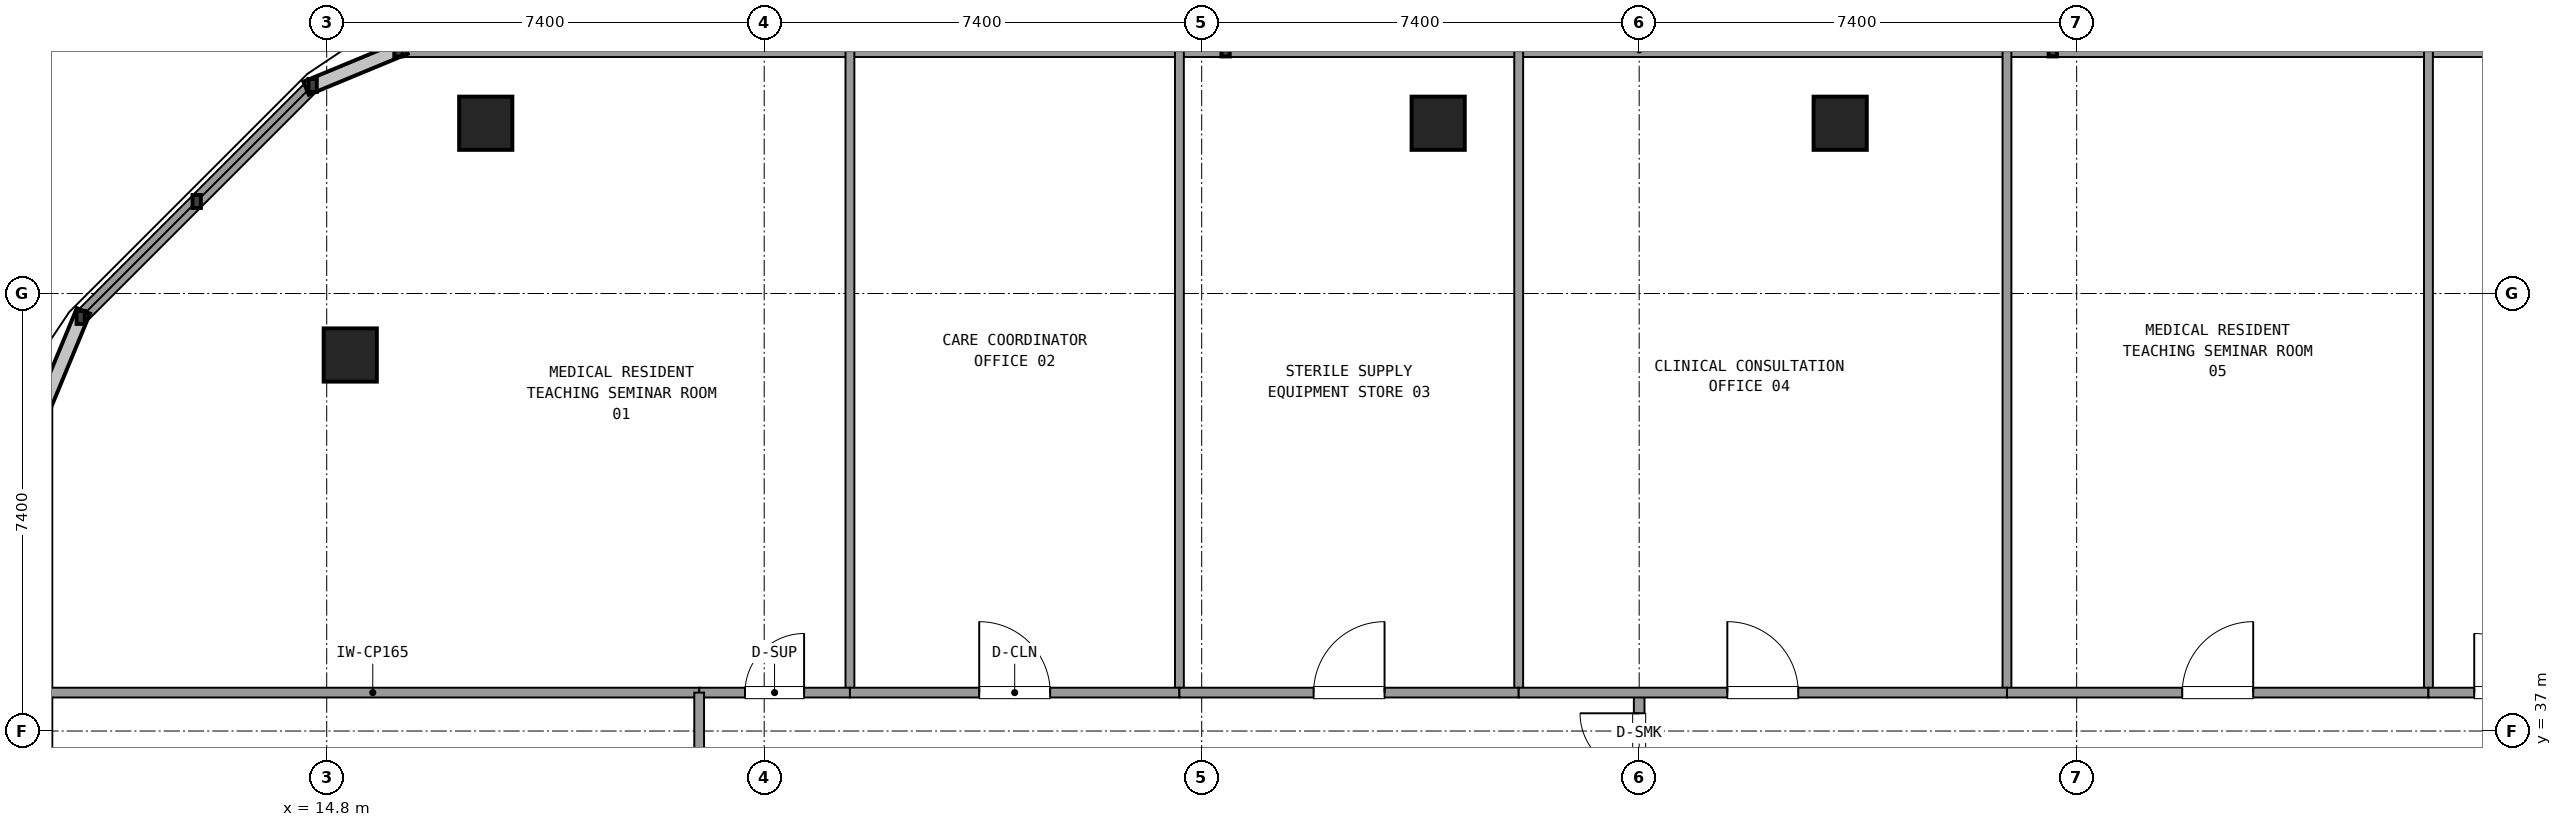
"""IFC4 building model, lengths in metres.
Left out: names, types, materials, properties, quantities, classifications, styles, units other than length and angle.
Written with IfcOpenShell. Run it as: python <this file> out.ifc"""

import sys

from ifc_helpers import new_model, si_unit, direction, frame, frame_2d, origin, origin_2d, place, context, subcontext, project, spatial, rectangle, extrude, element, fill, save


model = new_model("IFC4")
c1 = context("Model", 3, precision=1e-05, world=origin(), true_north=direction((0.0, 1.0)))
c2 = subcontext(c1, "Body", "Model", "MODEL_VIEW")
j1 = project(units=[si_unit("LENGTHUNIT", "METRE"), si_unit("PLANEANGLEUNIT", "RADIAN")], contexts=[c1])
p1 = place(None, origin())
s1 = spatial("IfcSite", under=j1, at=p1, CompositionType="ELEMENT")
p2 = place(p1, origin())
s2 = spatial("IfcBuilding", under=s1, at=p2, CompositionType="ELEMENT")
p3 = place(p2, frame((0.0, 0.0, 228.78)))
s3 = spatial("IfcBuildingStorey", under=s2, at=p3, CompositionType="ELEMENT", Elevation=228.78)
for number, where, z_axis, x_axis in (
    (1, (40.4, 47.28, 0.0), (0.0, 0.0, 1.0), (1.0, 0.0, 0.0)),
    (2, (33.6, 47.28, 0.0), (0.0, 0.0, 1.0), (1.0, 0.0, 0.0)),
    (3, (17.49, 47.28, 0.0), (0.0, 0.0, 1.0), (1.0, 0.0, 0.0)),
    (4, (15.198, 43.36, 0.0), (0.0, 0.0, 1.0), (1.0, 0.0, 0.0)),
):
    element("IfcColumn", number, at=place(p3, frame(where, z_axis=z_axis, x_axis=x_axis)), inside=s3, PredefinedType="COLUMN", context=c2, shape_type="SweptSolid", body=[
        extrude(rectangle(XDim=0.9, YDim=0.9, at=origin_2d()), origin(), (0.0, 0.0, 1.0), 3.6),
    ])
p4 = place(p3, frame((57.987, 48.52, 0.0), z_axis=(0.0, 0.0, 1.0), x_axis=(-1.0, 0.0, 0.0)))
e5 = element("IfcWall", 5, at=p4, inside=s3, PredefinedType="SOLIDWALL", context=c2, shape_type="SweptSolid", body=[
    extrude(rectangle(XDim=41.974, YDim=0.24, at=frame_2d((20.987, 0.0))), origin(), (0.0, 0.0, 1.0), 0.85),
])
p5 = place(p3, frame((14.562, 47.919, 0.0), z_axis=(0.0, 0.0, 1.0), x_axis=(-0.707128783731, -0.707084777957, 0.0)))
e6 = element("IfcWall", 6, at=p5, inside=s3, PredefinedType="SOLIDWALL", context=c2, shape_type="SweptSolid", body=[
    extrude(rectangle(XDim=5.548, YDim=0.24, at=frame_2d((2.774, 0.0))), origin(), (0.0, 0.0, 1.0), 0.85),
])
p6 = place(p3, frame((10.038, 42.545, 0.0), z_axis=(0.0, 0.0, 1.0), x_axis=(0.0, -1.0, 0.0)))
e7 = element("IfcWall", 7, at=p6, inside=s3, PredefinedType="SOLIDWALL", context=c2, shape_type="SweptSolid", body=[
    extrude(rectangle(XDim=15.105, YDim=0.24, at=frame_2d((7.552, 0.0))), origin(), (0.0, 0.0, 1.0), 0.85),
])
p7 = place(p3, frame((37.0, 34.95, 0.0), z_axis=(0.0, 0.0, 1.0), x_axis=(0.0, 1.0, 0.0)))
e8 = element("IfcWall", 8, at=p7, inside=s3, PredefinedType="PARTITIONING", context=c2, shape_type="SweptSolid", body=[
    extrude(rectangle(XDim=2.7, YDim=0.18, at=frame_2d((1.35, 0.0))), origin(), (0.0, 0.0, 1.0), 2.59),
])
p8 = place(p7, frame((0.35, 0.0, 0.0)))
e9 = element("IfcOpeningElement", 9, at=p8, cuts=e8, PredefinedType="OPENING", context=c2, shape_type="SweptSolid", body=[
    extrude(rectangle(XDim=2.0, YDim=2.2, at=frame_2d((1.0, 1.1))), frame((0.0, 0.1, 0.0), z_axis=(0.0, -1.0, 0.0), x_axis=(1.0, 0.0, 0.0)), (0.0, 0.0, 1.0), 0.2),
])
p9 = place(p3, frame((10.058, 37.65, 0.0), z_axis=(0.0, 0.0, 1.0), x_axis=(1.0, 0.0, 0.0)))
e10 = element("IfcWall", 10, at=p9, inside=s3, PredefinedType="PARTITIONING", context=c2, shape_type="SweptSolid", body=[
    extrude(rectangle(XDim=11.042, YDim=0.165, at=frame_2d((5.521, 0.0))), origin(), (0.0, 0.0, 1.0), 2.59),
])
p10 = place(p3, frame((23.65, 37.65, 0.0), z_axis=(0.0, 0.0, 1.0), x_axis=(0.0, 1.0, 0.0)))
e11 = element("IfcWall", 11, at=p10, inside=s3, PredefinedType="PARTITIONING", context=c2, shape_type="SweptSolid", body=[
    extrude(rectangle(XDim=10.85, YDim=0.15, at=frame_2d((5.425, 0.0))), origin(), (0.0, 0.0, 1.0), 2.59),
])
p11 = place(p3, frame((21.1, 37.65, 0.0), z_axis=(0.0, 0.0, 1.0), x_axis=(1.0, 0.0, 0.0)))
e12 = element("IfcWall", 12, at=p11, inside=s3, PredefinedType="PARTITIONING", context=c2, shape_type="SweptSolid", body=[
    extrude(rectangle(XDim=2.55, YDim=0.165, at=frame_2d((1.275, 0.0))), origin(), (0.0, 0.0, 1.0), 2.59),
])
p12 = place(p11, frame((0.775, 0.0, 0.0)))
e13 = element("IfcOpeningElement", 13, at=p12, cuts=e12, PredefinedType="OPENING", context=c2, shape_type="SweptSolid", body=[
    extrude(rectangle(XDim=1.0, YDim=2.15, at=frame_2d((0.5, 1.075))), frame((0.0, 0.093, 0.0), z_axis=(0.0, -1.0, 0.0), x_axis=(1.0, 0.0, 0.0)), (0.0, 0.0, 1.0), 0.185),
])
p13 = place(p3, frame((29.223, 37.65, 0.0), z_axis=(0.0, 0.0, 1.0), x_axis=(0.0, 1.0, 0.0)))
e14 = element("IfcWall", 14, at=p13, inside=s3, PredefinedType="PARTITIONING", context=c2, shape_type="SweptSolid", body=[
    extrude(rectangle(XDim=10.85, YDim=0.15, at=frame_2d((5.425, 0.0))), origin(), (0.0, 0.0, 1.0), 2.59),
])
p14 = place(p3, frame((23.65, 37.65, 0.0), z_axis=(0.0, 0.0, 1.0), x_axis=(1.0, 0.0, 0.0)))
e15 = element("IfcWall", 15, at=p14, inside=s3, PredefinedType="PARTITIONING", context=c2, shape_type="SweptSolid", body=[
    extrude(rectangle(XDim=5.573, YDim=0.165, at=frame_2d((2.787, 0.0))), origin(), (0.0, 0.0, 1.0), 2.59),
])
p15 = place(p14, frame((2.187, 0.0, 0.0)))
e16 = element("IfcOpeningElement", 16, at=p15, cuts=e15, PredefinedType="OPENING", context=c2, shape_type="SweptSolid", body=[
    extrude(rectangle(XDim=1.2, YDim=2.15, at=frame_2d((0.6, 1.075))), frame((0.0, 0.093, 0.0), z_axis=(0.0, -1.0, 0.0), x_axis=(1.0, 0.0, 0.0)), (0.0, 0.0, 1.0), 0.185),
])
p16 = place(p3, frame((34.962, 37.65, 0.0), z_axis=(0.0, 0.0, 1.0), x_axis=(0.0, 1.0, 0.0)))
e17 = element("IfcWall", 17, at=p16, inside=s3, PredefinedType="PARTITIONING", context=c2, shape_type="SweptSolid", body=[
    extrude(rectangle(XDim=10.85, YDim=0.15, at=frame_2d((5.425, 0.0))), origin(), (0.0, 0.0, 1.0), 2.59),
])
p17 = place(p3, frame((29.223, 37.65, 0.0), z_axis=(0.0, 0.0, 1.0), x_axis=(1.0, 0.0, 0.0)))
e18 = element("IfcWall", 18, at=p17, inside=s3, PredefinedType="PARTITIONING", context=c2, shape_type="SweptSolid", body=[
    extrude(rectangle(XDim=5.739, YDim=0.165, at=frame_2d((2.87, 0.0))), origin(), (0.0, 0.0, 1.0), 2.59),
])
p18 = place(p17, frame((2.27, 0.0, 0.0)))
e19 = element("IfcOpeningElement", 19, at=p18, cuts=e18, PredefinedType="OPENING", context=c2, shape_type="SweptSolid", body=[
    extrude(rectangle(XDim=1.2, YDim=2.15, at=frame_2d((0.6, 1.075))), frame((0.0, 0.093, 0.0), z_axis=(0.0, -1.0, 0.0), x_axis=(1.0, 0.0, 0.0)), (0.0, 0.0, 1.0), 0.185),
])
p19 = place(p3, frame((43.221, 37.65, 0.0), z_axis=(0.0, 0.0, 1.0), x_axis=(0.0, 1.0, 0.0)))
e20 = element("IfcWall", 20, at=p19, inside=s3, PredefinedType="PARTITIONING", context=c2, shape_type="SweptSolid", body=[
    extrude(rectangle(XDim=10.85, YDim=0.15, at=frame_2d((5.425, 0.0))), origin(), (0.0, 0.0, 1.0), 2.59),
])
p20 = place(p3, frame((34.962, 37.65, 0.0), z_axis=(0.0, 0.0, 1.0), x_axis=(1.0, 0.0, 0.0)))
e21 = element("IfcWall", 21, at=p20, inside=s3, PredefinedType="PARTITIONING", context=c2, shape_type="SweptSolid", body=[
    extrude(rectangle(XDim=8.259, YDim=0.165, at=frame_2d((4.129, 0.0))), origin(), (0.0, 0.0, 1.0), 2.59),
])
p21 = place(p20, frame((3.529, 0.0, 0.0)))
e22 = element("IfcOpeningElement", 22, at=p21, cuts=e21, PredefinedType="OPENING", context=c2, shape_type="SweptSolid", body=[
    extrude(rectangle(XDim=1.2, YDim=2.15, at=frame_2d((0.6, 1.075))), frame((0.0, 0.093, 0.0), z_axis=(0.0, -1.0, 0.0), x_axis=(1.0, 0.0, 0.0)), (0.0, 0.0, 1.0), 0.185),
])
p22 = place(p3, frame((50.35, 37.65, 0.0), z_axis=(0.0, 0.0, 1.0), x_axis=(0.0, 1.0, 0.0)))
e23 = element("IfcWall", 23, at=p22, inside=s3, PredefinedType="PARTITIONING", context=c2, shape_type="SweptSolid", body=[
    extrude(rectangle(XDim=10.85, YDim=0.15, at=frame_2d((5.425, 0.0))), origin(), (0.0, 0.0, 1.0), 2.59),
])
p23 = place(p3, frame((43.221, 37.65, 0.0), z_axis=(0.0, 0.0, 1.0), x_axis=(1.0, 0.0, 0.0)))
e24 = element("IfcWall", 24, at=p23, inside=s3, PredefinedType="PARTITIONING", context=c2, shape_type="SweptSolid", body=[
    extrude(rectangle(XDim=7.129, YDim=0.165, at=frame_2d((3.564, 0.0))), origin(), (0.0, 0.0, 1.0), 2.59),
])
p24 = place(p23, frame((2.965, 0.0, 0.0)))
e25 = element("IfcOpeningElement", 25, at=p24, cuts=e24, PredefinedType="OPENING", context=c2, shape_type="SweptSolid", body=[
    extrude(rectangle(XDim=1.2, YDim=2.15, at=frame_2d((0.6, 1.075))), frame((0.0, 0.093, 0.0), z_axis=(0.0, -1.0, 0.0), x_axis=(1.0, 0.0, 0.0)), (0.0, 0.0, 1.0), 0.185),
])
p25 = place(p3, frame((50.35, 37.65, 0.0), z_axis=(0.0, 0.0, 1.0), x_axis=(1.0, 0.0, 0.0)))
e26 = element("IfcWall", 26, at=p25, inside=s3, PredefinedType="PARTITIONING", context=c2, shape_type="SweptSolid", body=[
    extrude(rectangle(XDim=2.55, YDim=0.165, at=frame_2d((1.275, 0.0))), origin(), (0.0, 0.0, 1.0), 2.59),
])
p26 = place(p25, frame((0.775, 0.0, 0.0)))
e27 = element("IfcOpeningElement", 27, at=p26, cuts=e26, PredefinedType="OPENING", context=c2, shape_type="SweptSolid", body=[
    extrude(rectangle(XDim=1.0, YDim=2.15, at=frame_2d((0.5, 1.075))), frame((0.0, 0.093, 0.0), z_axis=(0.0, -1.0, 0.0), x_axis=(1.0, 0.0, 0.0)), (0.0, 0.0, 1.0), 0.185),
])
p27 = place(p3, frame((21.1, 30.28, 0.0), z_axis=(0.0, 0.0, 1.0), x_axis=(0.0, 1.0, 0.0)))
e28 = element("IfcWall", 28, at=p27, inside=s3, PredefinedType="PARTITIONING", context=c2, shape_type="SweptSolid", body=[
    extrude(rectangle(XDim=7.37, YDim=0.165, at=frame_2d((3.685, 0.0))), origin(), (0.0, 0.0, 1.0), 2.59),
])
p28 = place(p27, frame((3.085, 0.0, 0.0)))
e29 = element("IfcOpeningElement", 29, at=p28, cuts=e28, PredefinedType="OPENING", context=c2, shape_type="SweptSolid", body=[
    extrude(rectangle(XDim=1.2, YDim=2.15, at=frame_2d((0.6, 1.075))), frame((0.0, 0.093, 0.0), z_axis=(0.0, -1.0, 0.0), x_axis=(1.0, 0.0, 0.0)), (0.0, 0.0, 1.0), 0.185),
])
p29 = place(p8, origin())
e30 = element("IfcDoor", 30, at=p29, inside=s3, OperationType="DOUBLE_DOOR_SINGLE_SWING", PredefinedType="DOOR", context=c2, shape_type="SweptSolid", body=[
    extrude(rectangle(XDim=2.0, YDim=2.2, at=frame_2d((1.0, 1.1))), frame((0.0, 0.025, 0.0), z_axis=(0.0, -1.0, 0.0), x_axis=(1.0, 0.0, 0.0)), (0.0, 0.0, 1.0), 0.05),
])
fill(e9, e30)
p30 = place(p12, origin())
e31 = element("IfcDoor", 31, at=p30, inside=s3, OperationType="SINGLE_SWING_RIGHT", PredefinedType="DOOR", context=c2, shape_type="SweptSolid", body=[
    extrude(rectangle(XDim=1.0, YDim=2.15, at=frame_2d((0.5, 1.075))), frame((0.0, 0.025, 0.0), z_axis=(0.0, -1.0, 0.0), x_axis=(1.0, 0.0, 0.0)), (0.0, 0.0, 1.0), 0.05),
])
fill(e13, e31)
p31 = place(p15, origin())
e32 = element("IfcDoor", 32, at=p31, inside=s3, OperationType="SINGLE_SWING_LEFT", PredefinedType="DOOR", context=c2, shape_type="SweptSolid", body=[
    extrude(rectangle(XDim=1.2, YDim=2.15, at=frame_2d((0.6, 1.075))), frame((0.0, 0.025, 0.0), z_axis=(0.0, -1.0, 0.0), x_axis=(1.0, 0.0, 0.0)), (0.0, 0.0, 1.0), 0.05),
])
fill(e16, e32)
p32 = place(p18, origin())
e33 = element("IfcDoor", 33, at=p32, inside=s3, OperationType="SINGLE_SWING_RIGHT", PredefinedType="DOOR", context=c2, shape_type="SweptSolid", body=[
    extrude(rectangle(XDim=1.2, YDim=2.15, at=frame_2d((0.6, 1.075))), frame((0.0, 0.025, 0.0), z_axis=(0.0, -1.0, 0.0), x_axis=(1.0, 0.0, 0.0)), (0.0, 0.0, 1.0), 0.05),
])
fill(e19, e33)
p33 = place(p21, origin())
e34 = element("IfcDoor", 34, at=p33, inside=s3, OperationType="SINGLE_SWING_LEFT", PredefinedType="DOOR", context=c2, shape_type="SweptSolid", body=[
    extrude(rectangle(XDim=1.2, YDim=2.15, at=frame_2d((0.6, 1.075))), frame((0.0, 0.025, 0.0), z_axis=(0.0, -1.0, 0.0), x_axis=(1.0, 0.0, 0.0)), (0.0, 0.0, 1.0), 0.05),
])
fill(e22, e34)
p34 = place(p24, origin())
e35 = element("IfcDoor", 35, at=p34, inside=s3, OperationType="SINGLE_SWING_RIGHT", PredefinedType="DOOR", context=c2, shape_type="SweptSolid", body=[
    extrude(rectangle(XDim=1.2, YDim=2.15, at=frame_2d((0.6, 1.075))), frame((0.0, 0.025, 0.0), z_axis=(0.0, -1.0, 0.0), x_axis=(1.0, 0.0, 0.0)), (0.0, 0.0, 1.0), 0.05),
])
fill(e25, e35)
p35 = place(p26, origin())
e36 = element("IfcDoor", 36, at=p35, inside=s3, OperationType="SINGLE_SWING_LEFT", PredefinedType="DOOR", context=c2, shape_type="SweptSolid", body=[
    extrude(rectangle(XDim=1.0, YDim=2.15, at=frame_2d((0.5, 1.075))), frame((0.0, 0.025, 0.0), z_axis=(0.0, -1.0, 0.0), x_axis=(1.0, 0.0, 0.0)), (0.0, 0.0, 1.0), 0.05),
])
fill(e27, e36)
save(model, sys.argv[1])
